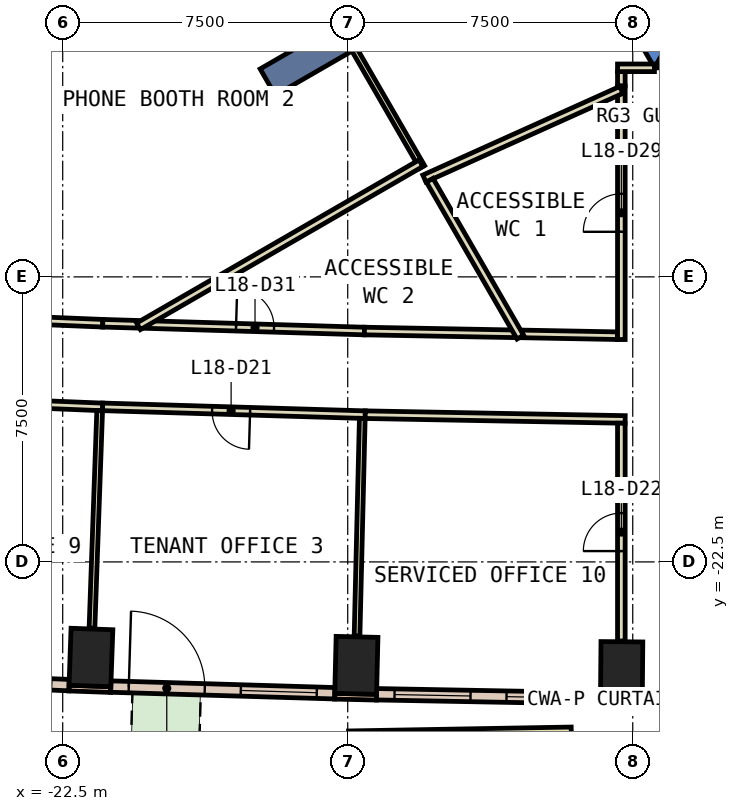
"""IFC4 building model, lengths in metres.
Left out: names, types, materials, properties, quantities, classifications, styles, units other than length and angle.
Written with IfcOpenShell. Run it as: python <this file> out.ifc"""

import sys

from ifc_helpers import new_model, si_unit, direction, frame, frame_2d, origin, origin_2d, place, context, subcontext, project, spatial, polyline, rectangle, outline, extrude, element, fill, save


model = new_model("IFC4")
c1 = context("Model", 3, precision=1e-05, world=origin(), true_north=direction((0.0, 1.0)))
c2 = subcontext(c1, "Body", "Model", "MODEL_VIEW")
j1 = project(units=[si_unit("LENGTHUNIT", "METRE"), si_unit("PLANEANGLEUNIT", "RADIAN")], contexts=[c1])
p1 = place(None, origin())
s1 = spatial("IfcSite", under=j1, at=p1, CompositionType="ELEMENT")
p2 = place(p1, origin())
s2 = spatial("IfcBuilding", under=s1, at=p2, CompositionType="ELEMENT")
p3 = place(p2, frame((0.0, 0.0, 86.6)))
s3 = spatial("IfcBuildingStorey", under=s2, at=p3, CompositionType="ELEMENT", Elevation=86.6)
for number, where, z_axis, x_axis in (
    (1, (-21.757, -25.015, 0.0), (0.0, 0.0, 1.0), (-0.999, 0.035, 0.0)),
    (2, (-14.773, -25.222, 0.0), (0.0, 0.0, 1.0), (-1.0, 0.024, 0.0)),
    (3, (-7.792, -25.351, 0.0), (0.0, 0.0, 1.0), (-1.0, 0.009, 0.0)),
):
    element("IfcColumn", number, at=place(p3, frame(where, z_axis=z_axis, x_axis=x_axis)), inside=s3, PredefinedType="COLUMN", context=c2, shape_type="SweptSolid", body=[
        extrude(rectangle(XDim=1.1, YDim=1.5, at=origin_2d()), origin(), (0.0, 0.0, 1.0), 3.8),
    ])
p4 = place(p3, frame((0.0, 0.0, -0.6)))
e4 = element("IfcWall", 4, at=p4, inside=s3, PredefinedType="SHEAR", context=c2, shape_type="SweptSolid", body=[
    extrude(outline(polyline([(-13.856, 2.5), (-6.928, -9.5), (-6.409, -8.6), (-12.817, 2.5), (-13.856, 2.5)])), origin(), (0.0, 0.0, 1.0), 4.4),
])
p5 = place(p3, frame((0.0, 0.0, -0.6)))
e5 = element("IfcWall", 5, at=p5, inside=s3, PredefinedType="SHEAR", context=c2, shape_type="SweptSolid", body=[
    extrude(outline(polyline([(3.75, -9.5), (3.75, -8.6), (-6.409, -8.6), (-6.928, -9.5), (3.75, -9.5)])), origin(), (0.0, 0.0, 1.0), 4.4),
])
p6 = place(p3, frame((-9.31, -5.375, -0.6), z_axis=(0.0, 0.0, 1.0), x_axis=(-0.866017533419, -0.500013631625, 0.0)))
e6 = element("IfcWall", 6, at=p6, inside=s3, PredefinedType="SHEAR", context=c2, shape_type="SweptSolid", body=[
    extrude(rectangle(XDim=9.0, YDim=0.8, at=frame_2d((4.5, 0.0))), origin(), (0.0, 0.0, 1.0), 4.4),
])
p7 = place(p3, frame((-22.336, -25.82, 0.0), z_axis=(0.0, 0.0, 1.0), x_axis=(0.999376638472, -0.035303462679, 0.0)))
e7 = element("IfcWall", 7, at=p7, inside=s3, PredefinedType="STANDARD", context=c2, shape_type="SweptSolid", body=[
    extrude(rectangle(XDim=1.1, YDim=0.15, at=frame_2d((0.55, 0.0))), origin(), (0.0, 0.0, 1.0), 3.8),
])
p8 = place(p3, frame((-15.343, -26.034, 0.0), z_axis=(0.0, 0.0, 1.0), x_axis=(0.999718180159, -0.023739424163, 0.0)))
e8 = element("IfcWall", 8, at=p8, inside=s3, PredefinedType="STANDARD", context=c2, shape_type="SweptSolid", body=[
    extrude(rectangle(XDim=1.1, YDim=0.15, at=frame_2d((0.55, 0.0))), origin(), (0.0, 0.0, 1.0), 3.8),
])
p9 = place(p3, frame((-8.349, -26.171, 0.0), z_axis=(0.0, 0.0, 1.0), x_axis=(0.99995860686, -0.009098602504, 0.0)))
e9 = element("IfcWall", 9, at=p9, inside=s3, PredefinedType="STANDARD", context=c2, shape_type="SweptSolid", body=[
    extrude(rectangle(XDim=1.1, YDim=0.15, at=frame_2d((0.55, 0.0))), origin(), (0.0, 0.0, 1.0), 3.8),
])
p10 = place(p3, frame((-28.205, -25.501, 0.0), z_axis=(0.0, 0.0, 1.0), x_axis=(0.999159360905, -0.040994774244, 0.0)))
e10 = element("IfcWall", 10, at=p10, inside=s3, PredefinedType="STANDARD", context=c2, shape_type="SweptSolid", body=[
    extrude(rectangle(XDim=5.878, YDim=0.3, at=frame_2d((2.939, 0.0))), origin(), (0.0, 0.0, 1.0), 3.8),
])
p11 = place(p10, frame((0.469, 0.0, 0.9)))
e11 = element("IfcOpeningElement", 11, at=p11, cuts=e10, PredefinedType="OPENING", context=c2, shape_type="SweptSolid", body=[
    extrude(rectangle(XDim=2.0, YDim=2.6, at=frame_2d((1.0, 1.3))), frame((0.0, 0.16, 0.0), z_axis=(0.0, -1.0, 0.0), x_axis=(1.0, 0.0, 0.0)), (0.0, 0.0, 1.0), 0.32),
])
p12 = place(p10, frame((3.408, 0.0, 0.9)))
e12 = element("IfcOpeningElement", 12, at=p12, cuts=e10, PredefinedType="OPENING", context=c2, shape_type="SweptSolid", body=[
    extrude(rectangle(XDim=2.0, YDim=2.6, at=frame_2d((1.0, 1.3))), frame((0.0, 0.16, 0.0), z_axis=(0.0, -1.0, 0.0), x_axis=(1.0, 0.0, 0.0)), (0.0, 0.0, 1.0), 0.32),
])
p13 = place(p3, frame((-21.235, -25.78, 0.0), z_axis=(0.0, 0.0, 1.0), x_axis=(0.999554487555, -0.029846715213, 0.0)))
e13 = element("IfcWall", 13, at=p13, inside=s3, PredefinedType="STANDARD", context=c2, shape_type="SweptSolid", body=[
    extrude(rectangle(XDim=5.898, YDim=0.3, at=frame_2d((2.949, 0.0))), origin(), (0.0, 0.0, 1.0), 3.8),
])
p14 = place(p13, frame((0.474, 0.0, 0.0)))
e14 = element("IfcOpeningElement", 14, at=p14, cuts=e13, PredefinedType="OPENING", context=c2, shape_type="SweptSolid", body=[
    extrude(rectangle(XDim=2.0, YDim=2.4, at=frame_2d((1.0, 1.2))), frame((0.0, 0.16, 0.0), z_axis=(0.0, -1.0, 0.0), x_axis=(1.0, 0.0, 0.0)), (0.0, 0.0, 1.0), 0.32),
])
p15 = place(p13, frame((3.423, 0.0, 0.9)))
e15 = element("IfcOpeningElement", 15, at=p15, cuts=e13, PredefinedType="OPENING", context=c2, shape_type="SweptSolid", body=[
    extrude(rectangle(XDim=2.0, YDim=2.6, at=frame_2d((1.0, 1.3))), frame((0.0, 0.16, 0.0), z_axis=(0.0, -1.0, 0.0), x_axis=(1.0, 0.0, 0.0)), (0.0, 0.0, 1.0), 0.32),
])
p16 = place(p3, frame((-14.242, -25.982, 0.0), z_axis=(0.0, 0.0, 1.0), x_axis=(0.999828633111, -0.018512277318, 0.0)))
e16 = element("IfcWall", 16, at=p16, inside=s3, PredefinedType="STANDARD", context=c2, shape_type="SweptSolid", body=[
    extrude(rectangle(XDim=5.895, YDim=0.3, at=frame_2d((2.948, 0.0))), origin(), (0.0, 0.0, 1.0), 3.8),
])
p17 = place(p16, frame((0.474, 0.0, 0.9)))
e17 = element("IfcOpeningElement", 17, at=p17, cuts=e16, PredefinedType="OPENING", context=c2, shape_type="SweptSolid", body=[
    extrude(rectangle(XDim=2.0, YDim=2.6, at=frame_2d((1.0, 1.3))), frame((0.0, 0.16, 0.0), z_axis=(0.0, -1.0, 0.0), x_axis=(1.0, 0.0, 0.0)), (0.0, 0.0, 1.0), 0.32),
])
p18 = place(p16, frame((3.421, 0.0, 0.9)))
e18 = element("IfcOpeningElement", 18, at=p18, cuts=e16, PredefinedType="OPENING", context=c2, shape_type="SweptSolid", body=[
    extrude(rectangle(XDim=2.0, YDim=2.6, at=frame_2d((1.0, 1.3))), frame((0.0, 0.16, 0.0), z_axis=(0.0, -1.0, 0.0), x_axis=(1.0, 0.0, 0.0)), (0.0, 0.0, 1.0), 0.32),
])
p19 = place(p3, frame((-14.962, -27.898, 0.0), z_axis=(0.0, 0.0, 1.0), x_axis=(0.999845423275, 0.017582080533, 0.0)))
e19 = element("IfcWall", 19, at=p19, inside=s3, PredefinedType="STANDARD", context=c2, shape_type="SweptSolid", body=[
    extrude(rectangle(XDim=5.86, YDim=1.9, at=frame_2d((2.93, 0.0))), origin(), (0.0, 0.0, 1.0), 0.8),
])
p20 = place(p3, frame((-10.408, -16.501, 0.0), z_axis=(0.0, 0.0, 1.0), x_axis=(0.999823568917, -0.018783797216, 0.0)))
e20 = element("IfcWall", 20, at=p20, inside=s3, PredefinedType="PARTITIONING", context=c2, shape_type="SweptSolid", body=[
    extrude(rectangle(XDim=2.509, YDim=0.2, at=frame_2d((1.254, 0.0))), origin(), (0.0, 0.0, 1.0), 3.8),
])
p21 = place(p3, frame((-21.317, -4.053, 0.0), z_axis=(0.0, 0.0, 1.0), x_axis=(-0.474391588657, -0.880313932987, 0.0)))
e21 = element("IfcWall", 21, at=p21, inside=s3, PredefinedType="PARTITIONING", context=c2, shape_type="SweptSolid", body=[
    extrude(rectangle(XDim=7.085, YDim=0.2, at=frame_2d((3.542, 0.0))), origin(), (0.0, 0.0, 1.0), 3.8),
])
p22 = place(p21, frame((3.042, 0.0, 0.0)))
e22 = element("IfcOpeningElement", 22, at=p22, cuts=e21, PredefinedType="OPENING", context=c2, shape_type="SweptSolid", body=[
    extrude(rectangle(XDim=1.0, YDim=2.1, at=frame_2d((0.5, 1.05))), frame((0.0, 0.11, 0.0), z_axis=(0.0, -1.0, 0.0), x_axis=(1.0, 0.0, 0.0)), (0.0, 0.0, 1.0), 0.22),
])
p23 = place(p3, frame((-27.24, -15.982, 0.0), z_axis=(0.0, 0.0, 1.0), x_axis=(0.999157128819, -0.041049140426, 0.0)))
e23 = element("IfcWall", 23, at=p23, inside=s3, PredefinedType="PARTITIONING", context=c2, shape_type="SweptSolid", body=[
    extrude(rectangle(XDim=5.799, YDim=0.2, at=frame_2d((2.899, 0.0))), origin(), (0.0, 0.0, 1.0), 3.8),
])
p24 = place(p3, frame((-21.446, -16.22, 0.0), z_axis=(0.0, 0.0, 1.0), x_axis=(0.999542625536, -0.030241358047, 0.0)))
e24 = element("IfcWall", 24, at=p24, inside=s3, PredefinedType="PARTITIONING", context=c2, shape_type="SweptSolid", body=[
    extrude(rectangle(XDim=0.928, YDim=0.2, at=frame_2d((0.464, 0.0))), origin(), (0.0, 0.0, 1.0), 3.8),
])
p25 = place(p3, frame((-20.318, -16.253, 0.0), z_axis=(0.0, 0.0, 1.0), x_axis=(0.999553385537, -0.029883598524, 0.0)))
e25 = element("IfcWall", 25, at=p25, inside=s3, PredefinedType="PARTITIONING", context=c2, shape_type="SweptSolid", body=[
    extrude(rectangle(XDim=5.76, YDim=0.2, at=frame_2d((2.88, 0.0))), origin(), (0.0, 0.0, 1.0), 3.8),
])
p26 = place(p25, frame((2.38, 0.0, 0.0)))
e26 = element("IfcOpeningElement", 26, at=p26, cuts=e25, PredefinedType="OPENING", context=c2, shape_type="SweptSolid", body=[
    extrude(rectangle(XDim=1.0, YDim=2.1, at=frame_2d((0.5, 1.05))), frame((0.0, 0.11, 0.0), z_axis=(0.0, -1.0, 0.0), x_axis=(1.0, 0.0, 0.0)), (0.0, 0.0, 1.0), 0.22),
])
p27 = place(p3, frame((-14.561, -16.425, 0.0), z_axis=(0.0, 0.0, 1.0), x_axis=(0.999829548691, -0.018462761553, 0.0)))
e27 = element("IfcWall", 27, at=p27, inside=s3, PredefinedType="PARTITIONING", context=c2, shape_type="SweptSolid", body=[
    extrude(rectangle(XDim=3.954, YDim=0.2, at=frame_2d((1.977, 0.0))), origin(), (0.0, 0.0, 1.0), 3.8),
])
p28 = place(p3, frame((-21.449, -18.422, 0.0), z_axis=(0.0, 0.0, 1.0), x_axis=(-0.999157588083, 0.041037960189, 0.0)))
e28 = element("IfcWall", 28, at=p28, inside=s3, PredefinedType="PARTITIONING", context=c2, shape_type="SweptSolid", body=[
    extrude(rectangle(XDim=6.169, YDim=0.2, at=frame_2d((3.084, 0.0))), origin(), (0.0, 0.0, 1.0), 3.8),
])
p29 = place(p28, frame((2.584, 0.0, 0.0)))
e29 = element("IfcOpeningElement", 29, at=p29, cuts=e28, PredefinedType="OPENING", context=c2, shape_type="SweptSolid", body=[
    extrude(rectangle(XDim=1.0, YDim=2.1, at=frame_2d((0.5, 1.05))), frame((0.0, 0.11, 0.0), z_axis=(0.0, -1.0, 0.0), x_axis=(1.0, 0.0, 0.0)), (0.0, 0.0, 1.0), 0.22),
])
p30 = place(p3, frame((-14.539, -18.626, 0.0), z_axis=(0.0, 0.0, 1.0), x_axis=(-0.999555675329, 0.029806910574, 0.0)))
e30 = element("IfcWall", 30, at=p30, inside=s3, PredefinedType="PARTITIONING", context=c2, shape_type="SweptSolid", body=[
    extrude(rectangle(XDim=6.913, YDim=0.2, at=frame_2d((3.457, 0.0))), origin(), (0.0, 0.0, 1.0), 3.8),
])
p31 = place(p30, frame((3.031, 0.0, 0.0)))
e31 = element("IfcOpeningElement", 31, at=p31, cuts=e30, PredefinedType="OPENING", context=c2, shape_type="SweptSolid", body=[
    extrude(rectangle(XDim=1.0, YDim=2.1, at=frame_2d((0.5, 1.05))), frame((0.0, 0.11, 0.0), z_axis=(0.0, -1.0, 0.0), x_axis=(1.0, 0.0, 0.0)), (0.0, 0.0, 1.0), 0.22),
])
p32 = place(p3, frame((-7.7, -18.752, 0.0), z_axis=(0.0, 0.0, 1.0), x_axis=(-0.999830394604, 0.018416895142, 0.0)))
e32 = element("IfcWall", 32, at=p32, inside=s3, PredefinedType="PARTITIONING", context=c2, shape_type="SweptSolid", body=[
    extrude(rectangle(XDim=6.84, YDim=0.2, at=frame_2d((3.42, 0.0))), origin(), (0.0, 0.0, 1.0), 3.8),
])
p33 = place(p3, frame((-7.8, -9.98, 0.0), z_axis=(0.0, 0.0, 1.0), x_axis=(0.0, 1.0, 0.0)))
e33 = element("IfcWall", 33, at=p33, inside=s3, PredefinedType="PARTITIONING", context=c2, shape_type="SweptSolid", body=[
    extrude(rectangle(XDim=0.381, YDim=0.2, at=frame_2d((0.19, 0.0))), origin(), (0.0, 0.0, 1.0), 3.8),
])
p34 = place(p3, frame((-7.9, -9.499, 0.0), z_axis=(0.0, 0.0, 1.0), x_axis=(1.0, 0.0, 0.0)))
e34 = element("IfcWall", 34, at=p34, inside=s3, PredefinedType="PARTITIONING", context=c2, shape_type="SweptSolid", body=[
    extrude(rectangle(XDim=0.971, YDim=0.2, at=frame_2d((0.485, 0.0))), origin(), (0.0, 0.0, 1.0), 3.8),
])
p35 = place(p3, frame((-7.8, -16.649, 0.0), z_axis=(0.0, 0.0, 1.0), x_axis=(0.0, 1.0, 0.0)))
e35 = element("IfcWall", 35, at=p35, inside=s3, PredefinedType="PARTITIONING", context=c2, shape_type="SweptSolid", body=[
    extrude(rectangle(XDim=6.669, YDim=0.2, at=frame_2d((3.334, 0.0))), origin(), (0.0, 0.0, 1.0), 3.8),
])
p36 = place(p35, frame((2.835, 0.0, 0.0)))
e36 = element("IfcOpeningElement", 36, at=p36, cuts=e35, PredefinedType="OPENING", context=c2, shape_type="SweptSolid", body=[
    extrude(rectangle(XDim=1.0, YDim=2.1, at=frame_2d((0.5, 1.05))), frame((0.0, 0.11, 0.0), z_axis=(0.0, -1.0, 0.0), x_axis=(1.0, 0.0, 0.0)), (0.0, 0.0, 1.0), 0.22),
])
p37 = place(p3, frame((-7.8, -24.581, 0.0), z_axis=(0.0, 0.0, 1.0), x_axis=(0.0, 1.0, 0.0)))
e37 = element("IfcWall", 37, at=p37, inside=s3, PredefinedType="PARTITIONING", context=c2, shape_type="SweptSolid", body=[
    extrude(rectangle(XDim=5.731, YDim=0.2, at=frame_2d((2.865, 0.0))), origin(), (0.0, 0.0, 1.0), 3.8),
])
p38 = place(p37, frame((2.366, 0.0, 0.0)))
e38 = element("IfcOpeningElement", 38, at=p38, cuts=e37, PredefinedType="OPENING", context=c2, shape_type="SweptSolid", body=[
    extrude(rectangle(XDim=1.0, YDim=2.1, at=frame_2d((0.5, 1.05))), frame((0.0, 0.11, 0.0), z_axis=(0.0, -1.0, 0.0), x_axis=(1.0, 0.0, 0.0)), (0.0, 0.0, 1.0), 0.22),
])
p39 = place(p3, frame((-7.8, -10.08, 0.0), z_axis=(0.0, 0.0, 1.0), x_axis=(-0.911938383636, -0.410327167577, 0.0)))
e39 = element("IfcWall", 39, at=p39, inside=s3, PredefinedType="PARTITIONING", context=c2, shape_type="SweptSolid", body=[
    extrude(rectangle(XDim=5.683, YDim=0.2, at=frame_2d((2.842, 0.0))), origin(), (0.0, 0.0, 1.0), 3.8),
])
p40 = place(p3, frame((-13.043, -12.108, 0.0), z_axis=(0.0, 0.0, 1.0), x_axis=(-0.499947764329, 0.866055559963, 0.0)))
e40 = element("IfcWall", 40, at=p40, inside=s3, PredefinedType="PARTITIONING", context=c2, shape_type="SweptSolid", body=[
    extrude(rectangle(XDim=3.564, YDim=0.15, at=frame_2d((1.782, 0.0))), origin(), (0.0, 0.0, 1.0), 3.8),
])
p41 = place(p3, frame((-10.458, -16.586, 0.0), z_axis=(0.0, 0.0, 1.0), x_axis=(-0.500121439648, 0.865955279218, 0.0)))
e41 = element("IfcWall", 41, at=p41, inside=s3, PredefinedType="PARTITIONING", context=c2, shape_type="SweptSolid", body=[
    extrude(rectangle(XDim=4.767, YDim=0.2, at=frame_2d((2.383, 0.0))), origin(), (0.0, 0.0, 1.0), 3.8),
])
p42 = place(p3, frame((-13.072, -12.009, 0.0), z_axis=(0.0, 0.0, 1.0), x_axis=(-0.865993734772, -0.500054848326, 0.0)))
e42 = element("IfcWall", 42, at=p42, inside=s3, PredefinedType="PARTITIONING", context=c2, shape_type="SweptSolid", body=[
    extrude(rectangle(XDim=8.583, YDim=0.2, at=frame_2d((4.292, 0.0))), origin(), (0.0, 0.0, 1.0), 3.8),
])
p43 = place(p3, frame((-21.527, -18.519, 0.0), z_axis=(0.0, 0.0, 1.0), x_axis=(-0.035408838092, -0.999372910472, 0.0)))
e43 = element("IfcWall", 43, at=p43, inside=s3, PredefinedType="PARTITIONING", context=c2, shape_type="SweptSolid", body=[
    extrude(rectangle(XDim=5.73, YDim=0.15, at=frame_2d((2.865, 0.0))), origin(), (0.0, 0.0, 1.0), 3.8),
])
p44 = place(p3, frame((-14.617, -18.724, 0.0), z_axis=(0.0, 0.0, 1.0), x_axis=(-0.02407553942, -0.999710142192, 0.0)))
e44 = element("IfcWall", 44, at=p44, inside=s3, PredefinedType="PARTITIONING", context=c2, shape_type="SweptSolid", body=[
    extrude(rectangle(XDim=5.729, YDim=0.15, at=frame_2d((2.865, 0.0))), origin(), (0.0, 0.0, 1.0), 3.8),
])
p45 = place(p14, origin())
e45 = element("IfcDoor", 45, at=p45, inside=s3, OperationType="SLIDING_TO_LEFT", PredefinedType="DOOR", context=c2, shape_type="SweptSolid", body=[
    extrude(rectangle(XDim=2.0, YDim=2.4, at=frame_2d((1.0, 1.2))), frame((0.0, 0.025, 0.0), z_axis=(0.0, -1.0, 0.0), x_axis=(1.0, 0.0, 0.0)), (0.0, 0.0, 1.0), 0.05),
])
fill(e14, e45)
p46 = place(p15, origin())
e46 = element("IfcWindow", 46, at=p46, inside=s3, PartitioningType="SINGLE_PANEL", PredefinedType="WINDOW", context=c2, shape_type="SweptSolid", body=[
    extrude(rectangle(XDim=2.0, YDim=2.6, at=frame_2d((1.0, 1.3))), frame((0.0, 0.03, 0.0), z_axis=(0.0, -1.0, 0.0), x_axis=(1.0, 0.0, 0.0)), (0.0, 0.0, 1.0), 0.06),
])
fill(e15, e46)
p47 = place(p17, origin())
e47 = element("IfcWindow", 47, at=p47, inside=s3, PartitioningType="SINGLE_PANEL", PredefinedType="WINDOW", context=c2, shape_type="SweptSolid", body=[
    extrude(rectangle(XDim=2.0, YDim=2.6, at=frame_2d((1.0, 1.3))), frame((0.0, 0.03, 0.0), z_axis=(0.0, -1.0, 0.0), x_axis=(1.0, 0.0, 0.0)), (0.0, 0.0, 1.0), 0.06),
])
fill(e17, e47)
p48 = place(p18, origin())
e48 = element("IfcWindow", 48, at=p48, inside=s3, PartitioningType="SINGLE_PANEL", PredefinedType="WINDOW", context=c2, shape_type="SweptSolid", body=[
    extrude(rectangle(XDim=2.0, YDim=2.6, at=frame_2d((1.0, 1.3))), frame((0.0, 0.03, 0.0), z_axis=(0.0, -1.0, 0.0), x_axis=(1.0, 0.0, 0.0)), (0.0, 0.0, 1.0), 0.06),
])
fill(e18, e48)
p49 = place(p31, origin())
e49 = element("IfcDoor", 49, at=p49, inside=s3, OperationType="SINGLE_SWING_LEFT", PredefinedType="DOOR", context=c2, shape_type="SweptSolid", body=[
    extrude(rectangle(XDim=1.0, YDim=2.1, at=frame_2d((0.5, 1.05))), frame((0.0, 0.025, 0.0), z_axis=(0.0, -1.0, 0.0), x_axis=(1.0, 0.0, 0.0)), (0.0, 0.0, 1.0), 0.05),
])
fill(e31, e49)
p50 = place(p38, origin())
e50 = element("IfcDoor", 50, at=p50, inside=s3, OperationType="SINGLE_SWING_LEFT", PredefinedType="DOOR", context=c2, shape_type="SweptSolid", body=[
    extrude(rectangle(XDim=1.0, YDim=2.1, at=frame_2d((0.5, 1.05))), frame((0.0, 0.025, 0.0), z_axis=(0.0, -1.0, 0.0), x_axis=(1.0, 0.0, 0.0)), (0.0, 0.0, 1.0), 0.05),
])
fill(e38, e50)
p51 = place(p36, origin())
e51 = element("IfcDoor", 51, at=p51, inside=s3, OperationType="SINGLE_SWING_LEFT", PredefinedType="DOOR", context=c2, shape_type="SweptSolid", body=[
    extrude(rectangle(XDim=1.0, YDim=2.1, at=frame_2d((0.5, 1.05))), frame((0.0, 0.025, 0.0), z_axis=(0.0, -1.0, 0.0), x_axis=(1.0, 0.0, 0.0)), (0.0, 0.0, 1.0), 0.05),
])
fill(e36, e51)
p52 = place(p26, origin())
e52 = element("IfcDoor", 52, at=p52, inside=s3, OperationType="SINGLE_SWING_LEFT", PredefinedType="DOOR", context=c2, shape_type="SweptSolid", body=[
    extrude(rectangle(XDim=1.0, YDim=2.1, at=frame_2d((0.5, 1.05))), frame((0.0, 0.025, 0.0), z_axis=(0.0, -1.0, 0.0), x_axis=(1.0, 0.0, 0.0)), (0.0, 0.0, 1.0), 0.05),
])
fill(e26, e52)
save(model, sys.argv[1])
